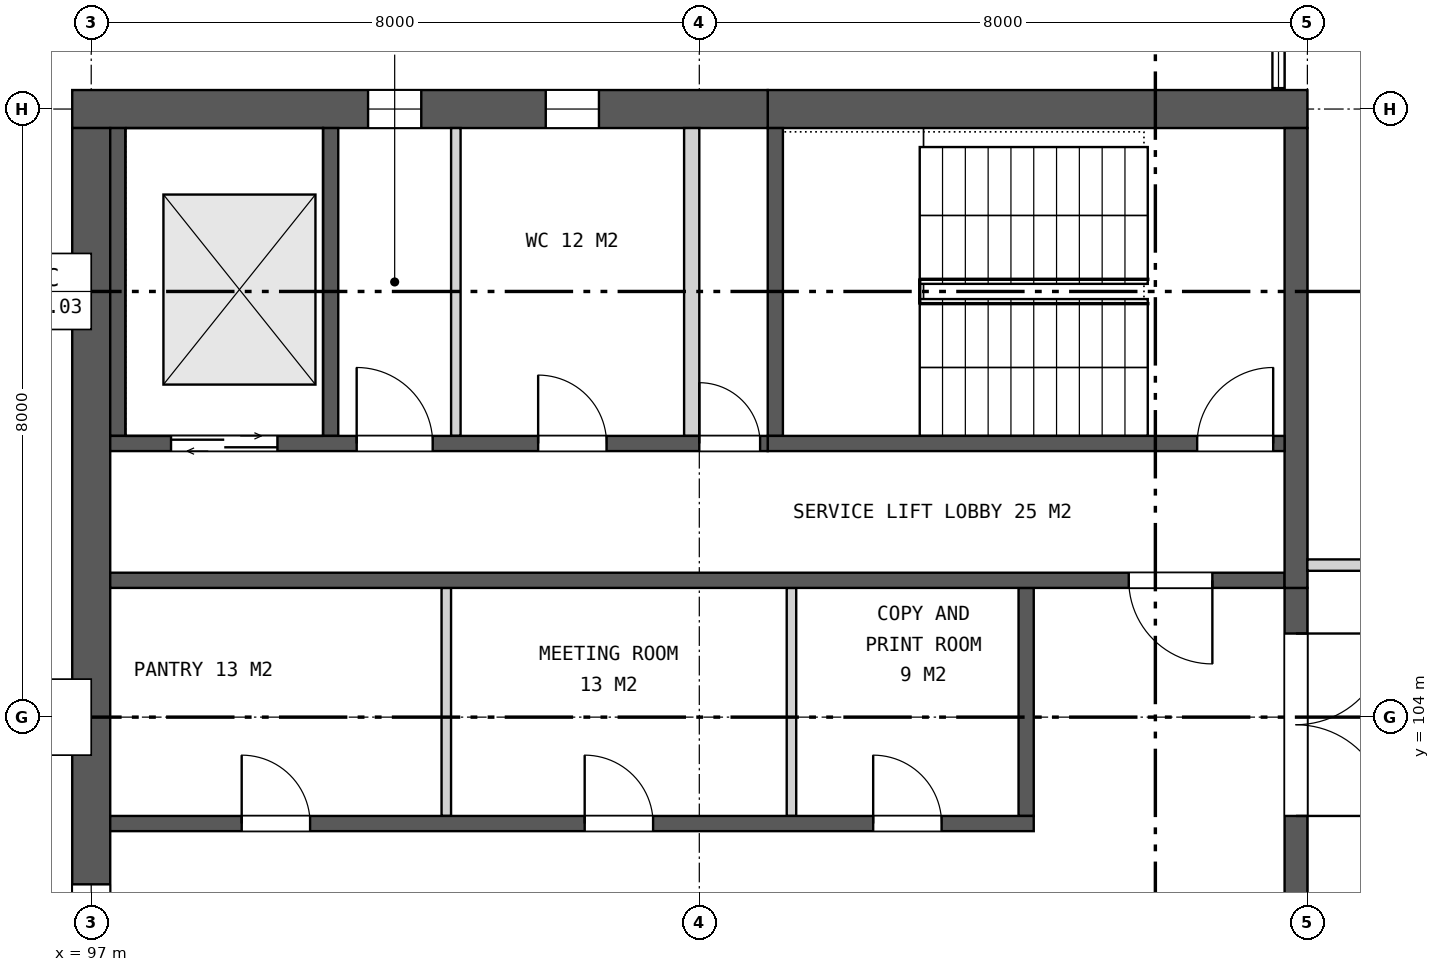
"""IFC4 building model, lengths in metres.
Left out: names, types, materials, properties, quantities, classifications, styles, units other than length and angle.
Written with IfcOpenShell. Run it as: python <this file> out.ifc"""

import sys

from ifc_helpers import new_model, si_unit, direction, frame, frame_2d, origin, place, context, subcontext, project, spatial, rectangle, extrude, element, fill, save


model = new_model("IFC4")
c1 = context("Model", 3, precision=1e-05, world=origin(), true_north=direction((0.0, 1.0)))
c2 = subcontext(c1, "Body", "Model", "MODEL_VIEW")
j1 = project(units=[si_unit("LENGTHUNIT", "METRE"), si_unit("PLANEANGLEUNIT", "RADIAN")], contexts=[c1])
p1 = place(None, origin())
s1 = spatial("IfcSite", under=j1, at=p1, CompositionType="ELEMENT")
p2 = place(p1, origin())
s2 = spatial("IfcBuilding", under=s1, at=p2, CompositionType="ELEMENT")
p3 = place(p2, frame((0.0, 0.0, 295.5)))
s3 = spatial("IfcBuildingStorey", under=s2, at=p3, CompositionType="ELEMENT", Elevation=295.5)
p4 = place(p3, frame((113.0, 112.0, 0.0), z_axis=(0.0, 0.0, 1.0), x_axis=(-1.0, 0.0, 0.0)))
e1 = element("IfcWall", 1, at=p4, inside=s3, PredefinedType="SHEAR", context=c2, shape_type="SweptSolid", body=[
    extrude(rectangle(XDim=7.1, YDim=0.5, at=frame_2d((3.55, 0.0))), origin(), (0.0, 0.0, 1.0), 4.2),
])
p5 = place(p3, frame((105.9, 112.0, 0.0), z_axis=(0.0, 0.0, 1.0), x_axis=(-1.0, 0.0, 0.0)))
e2 = element("IfcWall", 2, at=p5, inside=s3, PredefinedType="SHEAR", context=c2, shape_type="SweptSolid", body=[
    extrude(rectangle(XDim=9.15, YDim=0.5, at=frame_2d((4.575, 0.0))), origin(), (0.0, 0.0, 1.0), 4.2),
])
p6 = place(p5, frame((2.22, 0.0, 1.5)))
e3 = element("IfcOpeningElement", 3, at=p6, cuts=e2, PredefinedType="OPENING", context=c2, shape_type="SweptSolid", body=[
    extrude(rectangle(XDim=0.7, YDim=0.9, at=frame_2d((0.35, 0.45))), frame((0.0, 0.26, 0.0), z_axis=(0.0, -1.0, 0.0), x_axis=(1.0, 0.0, 0.0)), (0.0, 0.0, 1.0), 0.52),
])
p7 = place(p5, frame((4.558, 0.0, 1.5)))
e4 = element("IfcOpeningElement", 4, at=p7, cuts=e2, PredefinedType="OPENING", context=c2, shape_type="SweptSolid", body=[
    extrude(rectangle(XDim=0.7, YDim=0.9, at=frame_2d((0.35, 0.45))), frame((0.0, 0.26, 0.0), z_axis=(0.0, -1.0, 0.0), x_axis=(1.0, 0.0, 0.0)), (0.0, 0.0, 1.0), 0.52),
])
p8 = place(p3, frame((97.0, 111.75, 0.0), z_axis=(0.0, 0.0, 1.0), x_axis=(0.0, -1.0, 0.0)))
e5 = element("IfcWall", 5, at=p8, inside=s3, PredefinedType="SHEAR", context=c2, shape_type="SweptSolid", body=[
    extrude(rectangle(XDim=23.5, YDim=0.5, at=frame_2d((11.75, 0.0))), origin(), (0.0, 0.0, 1.0), 4.2),
])
p9 = place(p8, frame((9.95, 0.0, 0.15)))
e6 = element("IfcOpeningElement", 6, at=p9, cuts=e5, PredefinedType="OPENING", context=c2, shape_type="SweptSolid", body=[
    extrude(rectangle(XDim=3.6, YDim=3.0, at=frame_2d((1.8, 1.5))), frame((0.0, 0.26, 0.0), z_axis=(0.0, -1.0, 0.0), x_axis=(1.0, 0.0, 0.0)), (0.0, 0.0, 1.0), 0.52),
])
p10 = place(p3, frame((112.85, 105.7, 0.0), z_axis=(0.0, 0.0, 1.0), x_axis=(0.0, -1.0, 0.0)))
e7 = element("IfcWall", 7, at=p10, inside=s3, PredefinedType="SHEAR", context=c2, shape_type="SweptSolid", body=[
    extrude(rectangle(XDim=11.4, YDim=0.3, at=frame_2d((5.7, 0.0))), origin(), (0.0, 0.0, 1.0), 4.2),
])
p11 = place(p10, frame((0.6, 0.0, 0.0)))
e8 = element("IfcOpeningElement", 8, at=p11, cuts=e7, PredefinedType="OPENING", context=c2, shape_type="SweptSolid", body=[
    extrude(rectangle(XDim=2.4, YDim=2.4, at=frame_2d((1.2, 1.2))), frame((0.0, 0.16, 0.0), z_axis=(0.0, -1.0, 0.0), x_axis=(1.0, 0.0, 0.0)), (0.0, 0.0, 1.0), 0.32),
])
p12 = place(p10, frame((4.5, 0.0, 0.0)))
e9 = element("IfcOpeningElement", 9, at=p12, cuts=e7, PredefinedType="OPENING", context=c2, shape_type="SweptSolid", body=[
    extrude(rectangle(XDim=2.4, YDim=2.4, at=frame_2d((1.2, 1.2))), frame((0.0, 0.16, 0.0), z_axis=(0.0, -1.0, 0.0), x_axis=(1.0, 0.0, 0.0)), (0.0, 0.0, 1.0), 0.32),
])
p13 = place(p10, frame((8.4, 0.0, 0.0)))
e10 = element("IfcOpeningElement", 10, at=p13, cuts=e7, PredefinedType="OPENING", context=c2, shape_type="SweptSolid", body=[
    extrude(rectangle(XDim=2.4, YDim=2.4, at=frame_2d((1.2, 1.2))), frame((0.0, 0.16, 0.0), z_axis=(0.0, -1.0, 0.0), x_axis=(1.0, 0.0, 0.0)), (0.0, 0.0, 1.0), 0.32),
])
p14 = place(p3, frame((109.3, 105.7, 0.0), z_axis=(0.0, 0.0, 1.0), x_axis=(0.0, -1.0, 0.0)))
e11 = element("IfcWall", 11, at=p14, inside=s3, PredefinedType="SHEAR", context=c2, shape_type="SweptSolid", body=[
    extrude(rectangle(XDim=3.0, YDim=0.2, at=frame_2d((1.5, 0.0))), origin(), (0.0, 0.0, 1.0), 4.2),
])
for number, where, z_axis, x_axis in (
    (12, (106.212, 105.7, 0.0), (0.0, 0.0, 1.0), (0.0, -1.0, 0.0)),
    (13, (101.671, 105.7, 0.0), (0.0, 0.0, 1.0), (0.0, -1.0, 0.0)),
):
    element("IfcWall", number, at=place(p3, frame(where, z_axis=z_axis, x_axis=x_axis)), inside=s3, PredefinedType="PARTITIONING", context=c2, shape_type="SweptSolid", body=[
        extrude(rectangle(XDim=3.0, YDim=0.125, at=frame_2d((1.5, 0.0))), origin(), (0.0, 0.0, 1.0), 4.2),
    ])
p15 = place(p3, frame((109.4, 102.6, 0.0), z_axis=(0.0, 0.0, 1.0), x_axis=(-1.0, 0.0, 0.0)))
e14 = element("IfcWall", 14, at=p15, inside=s3, PredefinedType="SHEAR", context=c2, shape_type="SweptSolid", body=[
    extrude(rectangle(XDim=12.15, YDim=0.2, at=frame_2d((6.075, 0.0))), origin(), (0.0, 0.0, 1.0), 4.2),
])
p16 = place(p15, frame((1.212, 0.0, 0.0)))
e15 = element("IfcOpeningElement", 15, at=p16, cuts=e14, PredefinedType="OPENING", context=c2, shape_type="SweptSolid", body=[
    extrude(rectangle(XDim=0.9, YDim=2.1, at=frame_2d((0.45, 1.05))), frame((0.0, 0.11, 0.0), z_axis=(0.0, -1.0, 0.0), x_axis=(1.0, 0.0, 0.0)), (0.0, 0.0, 1.0), 0.22),
])
p17 = place(p15, frame((5.008, 0.0, 0.0)))
e16 = element("IfcOpeningElement", 16, at=p17, cuts=e14, PredefinedType="OPENING", context=c2, shape_type="SweptSolid", body=[
    extrude(rectangle(XDim=0.9, YDim=2.1, at=frame_2d((0.45, 1.05))), frame((0.0, 0.11, 0.0), z_axis=(0.0, -1.0, 0.0), x_axis=(1.0, 0.0, 0.0)), (0.0, 0.0, 1.0), 0.22),
])
p18 = place(p15, frame((9.521, 0.0, 0.0)))
e17 = element("IfcOpeningElement", 17, at=p18, cuts=e14, PredefinedType="OPENING", context=c2, shape_type="SweptSolid", body=[
    extrude(rectangle(XDim=0.9, YDim=2.1, at=frame_2d((0.45, 1.05))), frame((0.0, 0.11, 0.0), z_axis=(0.0, -1.0, 0.0), x_axis=(1.0, 0.0, 0.0)), (0.0, 0.0, 1.0), 0.22),
])
p19 = place(p3, frame((112.7, 105.8, 0.0), z_axis=(0.0, 0.0, 1.0), x_axis=(-1.0, 0.0, 0.0)))
e18 = element("IfcWall", 18, at=p19, inside=s3, PredefinedType="SHEAR", context=c2, shape_type="SweptSolid", body=[
    extrude(rectangle(XDim=15.45, YDim=0.2, at=frame_2d((7.725, 0.0))), origin(), (0.0, 0.0, 1.0), 4.2),
])
p20 = place(p19, frame((0.95, 0.0, 0.0)))
e19 = element("IfcOpeningElement", 19, at=p20, cuts=e18, PredefinedType="OPENING", context=c2, shape_type="SweptSolid", body=[
    extrude(rectangle(XDim=1.1, YDim=2.1, at=frame_2d((0.55, 1.05))), frame((0.0, 0.11, 0.0), z_axis=(0.0, -1.0, 0.0), x_axis=(1.0, 0.0, 0.0)), (0.0, 0.0, 1.0), 0.22),
])
p21 = place(p3, frame((112.85, 111.75, 0.0), z_axis=(0.0, 0.0, 1.0), x_axis=(0.0, -1.0, 0.0)))
e20 = element("IfcWall", 20, at=p21, inside=s3, PredefinedType="SHEAR", context=c2, shape_type="SweptSolid", body=[
    extrude(rectangle(XDim=6.05, YDim=0.3, at=frame_2d((3.025, 0.0))), origin(), (0.0, 0.0, 1.0), 4.2),
])
for number, where, z_axis, x_axis in (
    (21, (106.0, 111.75, 0.0), (0.0, 0.0, 1.0), (0.0, -1.0, 0.0)),
    (22, (100.15, 111.75, 0.0), (0.0, 0.0, 1.0), (0.0, -1.0, 0.0)),
    (23, (97.35, 111.75, 0.0), (0.0, 0.0, 1.0), (0.0, -1.0, 0.0)),
):
    element("IfcWall", number, at=place(p3, frame(where, z_axis=z_axis, x_axis=x_axis)), inside=s3, PredefinedType="SHEAR", context=c2, shape_type="SweptSolid", body=[
        extrude(rectangle(XDim=4.05, YDim=0.2, at=frame_2d((2.025, 0.0))), origin(), (0.0, 0.0, 1.0), 4.2),
    ])
p22 = place(p3, frame((104.9, 111.75, 0.0), z_axis=(0.0, 0.0, 1.0), x_axis=(0.0, -1.0, 0.0)))
e24 = element("IfcWall", 24, at=p22, inside=s3, PredefinedType="PARTITIONING", context=c2, shape_type="SweptSolid", body=[
    extrude(rectangle(XDim=4.05, YDim=0.2, at=frame_2d((2.025, 0.0))), origin(), (0.0, 0.0, 1.0), 4.2),
])
p23 = place(p3, frame((101.797, 111.75, 0.0), z_axis=(0.0, 0.0, 1.0), x_axis=(0.0, -1.0, 0.0)))
e25 = element("IfcWall", 25, at=p23, inside=s3, PredefinedType="PARTITIONING", context=c2, shape_type="SweptSolid", body=[
    extrude(rectangle(XDim=4.05, YDim=0.125, at=frame_2d((2.025, 0.0))), origin(), (0.0, 0.0, 1.0), 4.2),
])
p24 = place(p3, frame((112.7, 107.6, 0.0), z_axis=(0.0, 0.0, 1.0), x_axis=(-1.0, 0.0, 0.0)))
e26 = element("IfcWall", 26, at=p24, inside=s3, PredefinedType="SHEAR", context=c2, shape_type="SweptSolid", body=[
    extrude(rectangle(XDim=6.8, YDim=0.2, at=frame_2d((3.4, 0.0))), origin(), (0.0, 0.0, 1.0), 4.2),
])
p25 = place(p24, frame((0.15, 0.0, 0.0)))
e27 = element("IfcOpeningElement", 27, at=p25, cuts=e26, PredefinedType="OPENING", context=c2, shape_type="SweptSolid", body=[
    extrude(rectangle(XDim=1.0, YDim=2.1, at=frame_2d((0.5, 1.05))), frame((0.0, 0.11, 0.0), z_axis=(0.0, -1.0, 0.0), x_axis=(1.0, 0.0, 0.0)), (0.0, 0.0, 1.0), 0.22),
])
p26 = place(p3, frame((105.9, 107.6, 0.0), z_axis=(0.0, 0.0, 1.0), x_axis=(-1.0, 0.0, 0.0)))
e28 = element("IfcWall", 28, at=p26, inside=s3, PredefinedType="SHEAR", context=c2, shape_type="SweptSolid", body=[
    extrude(rectangle(XDim=8.65, YDim=0.2, at=frame_2d((4.325, 0.0))), origin(), (0.0, 0.0, 1.0), 4.2),
])
p27 = place(p26, frame((0.1, 0.0, 0.0)))
e29 = element("IfcOpeningElement", 29, at=p27, cuts=e28, PredefinedType="OPENING", context=c2, shape_type="SweptSolid", body=[
    extrude(rectangle(XDim=0.8, YDim=2.1, at=frame_2d((0.4, 1.05))), frame((0.0, 0.11, 0.0), z_axis=(0.0, -1.0, 0.0), x_axis=(1.0, 0.0, 0.0)), (0.0, 0.0, 1.0), 0.22),
])
p28 = place(p26, frame((2.12, 0.0, 0.0)))
e30 = element("IfcOpeningElement", 30, at=p28, cuts=e28, PredefinedType="OPENING", context=c2, shape_type="SweptSolid", body=[
    extrude(rectangle(XDim=0.9, YDim=2.1, at=frame_2d((0.45, 1.05))), frame((0.0, 0.11, 0.0), z_axis=(0.0, -1.0, 0.0), x_axis=(1.0, 0.0, 0.0)), (0.0, 0.0, 1.0), 0.22),
])
p29 = place(p26, frame((4.408, 0.0, 0.0)))
e31 = element("IfcOpeningElement", 31, at=p29, cuts=e28, PredefinedType="OPENING", context=c2, shape_type="SweptSolid", body=[
    extrude(rectangle(XDim=1.0, YDim=2.1, at=frame_2d((0.5, 1.05))), frame((0.0, 0.11, 0.0), z_axis=(0.0, -1.0, 0.0), x_axis=(1.0, 0.0, 0.0)), (0.0, 0.0, 1.0), 0.22),
])
p30 = place(p26, frame((6.45, 0.0, 0.0)))
e32 = element("IfcOpeningElement", 32, at=p30, cuts=e28, PredefinedType="OPENING", context=c2, shape_type="SweptSolid", body=[
    extrude(rectangle(XDim=1.4, YDim=2.1, at=frame_2d((0.7, 1.05))), frame((0.0, 0.11, 0.0), z_axis=(0.0, -1.0, 0.0), x_axis=(1.0, 0.0, 0.0)), (0.0, 0.0, 1.0), 0.22),
])
p31 = place(p3, frame((113.0, 106.0, 0.0), z_axis=(0.0, 0.0, 1.0), x_axis=(1.0, 0.0, 0.0)))
e33 = element("IfcWall", 33, at=p31, inside=s3, PredefinedType="PARTITIONING", context=c2, shape_type="SweptSolid", body=[
    extrude(rectangle(XDim=5.525, YDim=0.15, at=frame_2d((2.762, 0.0))), origin(), (0.0, 0.0, 1.0), 3.443),
])
p32 = place(p6, origin())
e34 = element("IfcWindow", 34, at=p32, inside=s3, PartitioningType="SINGLE_PANEL", PredefinedType="WINDOW", context=c2, shape_type="SweptSolid", body=[
    extrude(rectangle(XDim=0.7, YDim=0.9, at=frame_2d((0.35, 0.45))), frame((0.0, 0.03, 0.0), z_axis=(0.0, -1.0, 0.0), x_axis=(1.0, 0.0, 0.0)), (0.0, 0.0, 1.0), 0.06),
])
fill(e3, e34)
p33 = place(p7, origin())
e35 = element("IfcWindow", 35, at=p33, inside=s3, PartitioningType="SINGLE_PANEL", PredefinedType="WINDOW", context=c2, shape_type="SweptSolid", body=[
    extrude(rectangle(XDim=0.7, YDim=0.9, at=frame_2d((0.35, 0.45))), frame((0.0, 0.03, 0.0), z_axis=(0.0, -1.0, 0.0), x_axis=(1.0, 0.0, 0.0)), (0.0, 0.0, 1.0), 0.06),
])
fill(e4, e35)
p34 = place(p9, origin())
e36 = element("IfcWindow", 36, at=p34, inside=s3, PartitioningType="SINGLE_PANEL", PredefinedType="WINDOW", context=c2, shape_type="SweptSolid", body=[
    extrude(rectangle(XDim=3.6, YDim=3.0, at=frame_2d((1.8, 1.5))), frame((0.0, 0.03, 0.0), z_axis=(0.0, -1.0, 0.0), x_axis=(1.0, 0.0, 0.0)), (0.0, 0.0, 1.0), 0.06),
])
fill(e6, e36)
p35 = place(p11, origin())
e37 = element("IfcDoor", 37, at=p35, inside=s3, OperationType="DOUBLE_DOOR_SINGLE_SWING", PredefinedType="DOOR", context=c2, shape_type="SweptSolid", body=[
    extrude(rectangle(XDim=2.4, YDim=2.4, at=frame_2d((1.2, 1.2))), frame((0.0, 0.025, 0.0), z_axis=(0.0, -1.0, 0.0), x_axis=(1.0, 0.0, 0.0)), (0.0, 0.0, 1.0), 0.05),
])
fill(e8, e37)
p36 = place(p16, frame((0.9, 0.0, 0.0), z_axis=(0.0, 0.0, 1.0), x_axis=(-1.0, 0.0, 0.0)))
e38 = element("IfcDoor", 38, at=p36, inside=s3, OperationType="SINGLE_SWING_LEFT", PredefinedType="DOOR", context=c2, shape_type="SweptSolid", body=[
    extrude(rectangle(XDim=0.9, YDim=2.1, at=frame_2d((0.45, 1.05))), frame((0.0, 0.025, 0.0), z_axis=(0.0, -1.0, 0.0), x_axis=(1.0, 0.0, 0.0)), (0.0, 0.0, 1.0), 0.05),
])
fill(e15, e38)
p37 = place(p17, frame((0.9, 0.0, 0.0), z_axis=(0.0, 0.0, 1.0), x_axis=(-1.0, 0.0, 0.0)))
e39 = element("IfcDoor", 39, at=p37, inside=s3, OperationType="SINGLE_SWING_LEFT", PredefinedType="DOOR", context=c2, shape_type="SweptSolid", body=[
    extrude(rectangle(XDim=0.9, YDim=2.1, at=frame_2d((0.45, 1.05))), frame((0.0, 0.025, 0.0), z_axis=(0.0, -1.0, 0.0), x_axis=(1.0, 0.0, 0.0)), (0.0, 0.0, 1.0), 0.05),
])
fill(e16, e39)
p38 = place(p18, frame((0.9, 0.0, 0.0), z_axis=(0.0, 0.0, 1.0), x_axis=(-1.0, 0.0, 0.0)))
e40 = element("IfcDoor", 40, at=p38, inside=s3, OperationType="SINGLE_SWING_LEFT", PredefinedType="DOOR", context=c2, shape_type="SweptSolid", body=[
    extrude(rectangle(XDim=0.9, YDim=2.1, at=frame_2d((0.45, 1.05))), frame((0.0, 0.025, 0.0), z_axis=(0.0, -1.0, 0.0), x_axis=(1.0, 0.0, 0.0)), (0.0, 0.0, 1.0), 0.05),
])
fill(e17, e40)
p39 = place(p20, origin())
e41 = element("IfcDoor", 41, at=p39, inside=s3, OperationType="SINGLE_SWING_LEFT", PredefinedType="DOOR", context=c2, shape_type="SweptSolid", body=[
    extrude(rectangle(XDim=1.1, YDim=2.1, at=frame_2d((0.55, 1.05))), frame((0.0, 0.025, 0.0), z_axis=(0.0, -1.0, 0.0), x_axis=(1.0, 0.0, 0.0)), (0.0, 0.0, 1.0), 0.05),
])
fill(e19, e41)
p40 = place(p25, frame((1.0, 0.0, 0.0), z_axis=(0.0, 0.0, 1.0), x_axis=(-1.0, 0.0, 0.0)))
e42 = element("IfcDoor", 42, at=p40, inside=s3, OperationType="SINGLE_SWING_RIGHT", PredefinedType="DOOR", context=c2, shape_type="SweptSolid", body=[
    extrude(rectangle(XDim=1.0, YDim=2.1, at=frame_2d((0.5, 1.05))), frame((0.0, 0.025, 0.0), z_axis=(0.0, -1.0, 0.0), x_axis=(1.0, 0.0, 0.0)), (0.0, 0.0, 1.0), 0.05),
])
fill(e27, e42)
p41 = place(p27, frame((0.8, 0.0, 0.0), z_axis=(0.0, 0.0, 1.0), x_axis=(-1.0, 0.0, 0.0)))
e43 = element("IfcDoor", 43, at=p41, inside=s3, OperationType="SINGLE_SWING_LEFT", PredefinedType="DOOR", context=c2, shape_type="SweptSolid", body=[
    extrude(rectangle(XDim=0.8, YDim=2.1, at=frame_2d((0.4, 1.05))), frame((0.0, 0.025, 0.0), z_axis=(0.0, -1.0, 0.0), x_axis=(1.0, 0.0, 0.0)), (0.0, 0.0, 1.0), 0.05),
])
fill(e29, e43)
p42 = place(p28, frame((0.9, 0.0, 0.0), z_axis=(0.0, 0.0, 1.0), x_axis=(-1.0, 0.0, 0.0)))
e44 = element("IfcDoor", 44, at=p42, inside=s3, OperationType="SINGLE_SWING_LEFT", PredefinedType="DOOR", context=c2, shape_type="SweptSolid", body=[
    extrude(rectangle(XDim=0.9, YDim=2.1, at=frame_2d((0.45, 1.05))), frame((0.0, 0.025, 0.0), z_axis=(0.0, -1.0, 0.0), x_axis=(1.0, 0.0, 0.0)), (0.0, 0.0, 1.0), 0.05),
])
fill(e30, e44)
p43 = place(p29, frame((1.0, 0.0, 0.0), z_axis=(0.0, 0.0, 1.0), x_axis=(-1.0, 0.0, 0.0)))
e45 = element("IfcDoor", 45, at=p43, inside=s3, OperationType="SINGLE_SWING_LEFT", PredefinedType="DOOR", context=c2, shape_type="SweptSolid", body=[
    extrude(rectangle(XDim=1.0, YDim=2.1, at=frame_2d((0.5, 1.05))), frame((0.0, 0.025, 0.0), z_axis=(0.0, -1.0, 0.0), x_axis=(1.0, 0.0, 0.0)), (0.0, 0.0, 1.0), 0.05),
])
fill(e31, e45)
p44 = place(p30, origin())
e46 = element("IfcDoor", 46, at=p44, inside=s3, OperationType="DOUBLE_DOOR_SLIDING", PredefinedType="DOOR", context=c2, shape_type="SweptSolid", body=[
    extrude(rectangle(XDim=1.4, YDim=2.1, at=frame_2d((0.7, 1.05))), frame((0.0, 0.025, 0.0), z_axis=(0.0, -1.0, 0.0), x_axis=(1.0, 0.0, 0.0)), (0.0, 0.0, 1.0), 0.05),
])
fill(e32, e46)
save(model, sys.argv[1])
